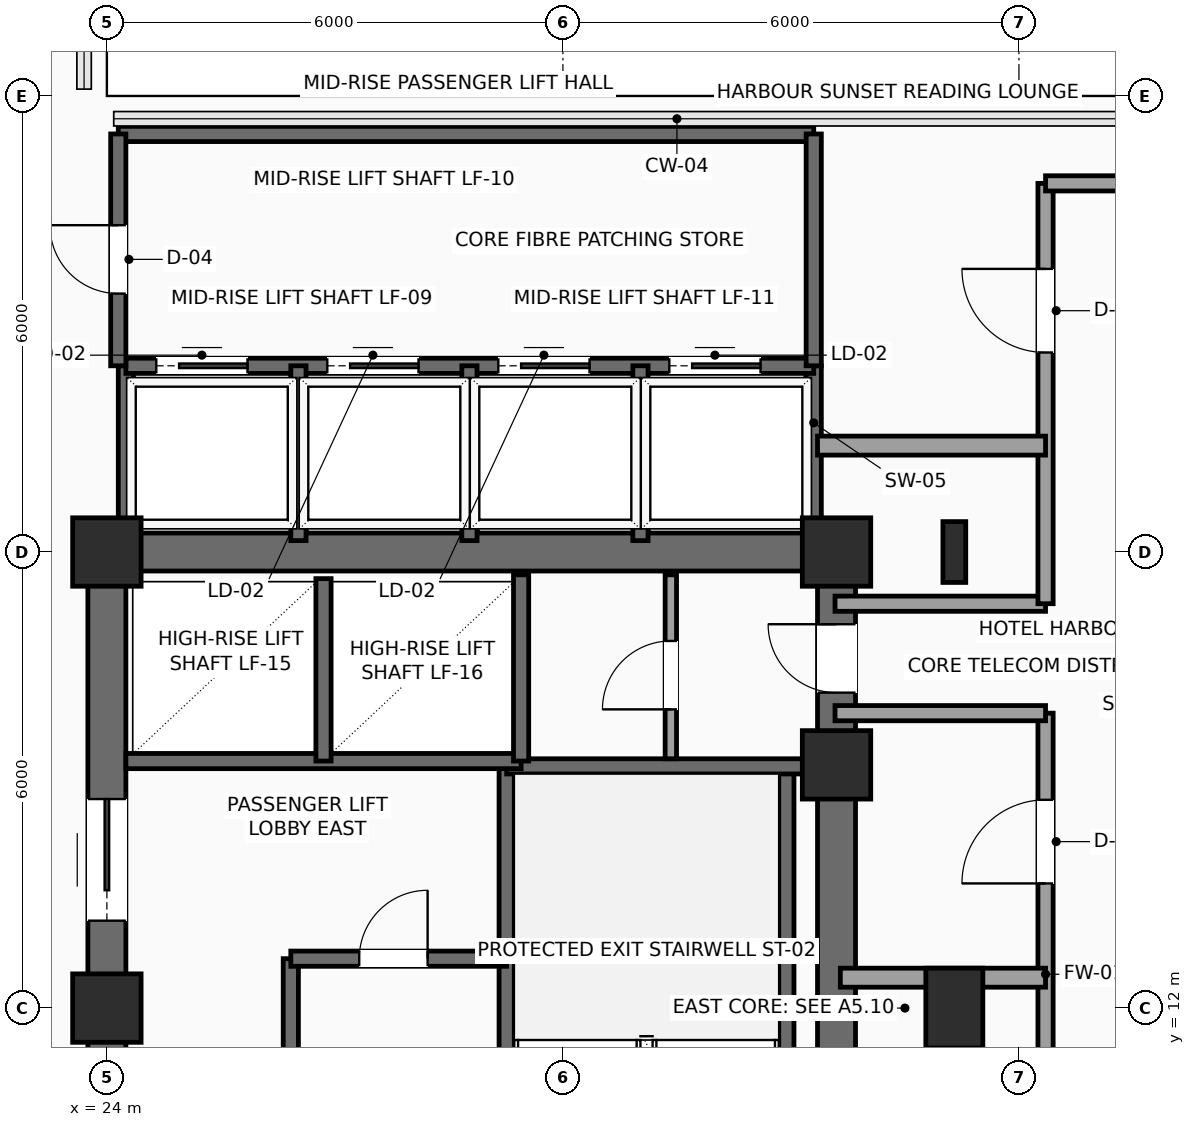
"""IFC4 building model, lengths in metres.
Left out: names, types, materials, properties, quantities, classifications, styles, units other than length and angle.
Written with IfcOpenShell. Run it as: python <this file> out.ifc"""

import sys

from ifc_helpers import new_model, si_unit, direction, frame, frame_2d, origin, origin_2d, place, context, subcontext, project, spatial, rectangle, i_section, extrude, element, fill, save


model = new_model("IFC4")
c1 = context("Model", 3, precision=1e-05, world=origin(), true_north=direction((0.0, 1.0)))
c2 = subcontext(c1, "Body", "Model", "MODEL_VIEW")
j1 = project(units=[si_unit("LENGTHUNIT", "METRE"), si_unit("PLANEANGLEUNIT", "RADIAN")], contexts=[c1])
p1 = place(None, origin())
s1 = spatial("IfcSite", under=j1, at=p1, CompositionType="ELEMENT")
p2 = place(p1, origin())
s2 = spatial("IfcBuilding", under=s1, at=p2, CompositionType="ELEMENT")
p3 = place(p2, frame((0.0, 0.0, 184.2)))
s3 = spatial("IfcBuildingStorey", under=s2, at=p3, CompositionType="ELEMENT", Elevation=184.2)
for number, where, z_axis, x_axis in (
    (1, (24.0, 12.0, 0.0), (0.0, 0.0, 1.0), (1.0, 0.0, 0.0)),
    (2, (24.0, 18.0, 0.0), (0.0, 0.0, 1.0), (1.0, 0.0, 0.0)),
    (3, (33.6, 15.2, 0.0), (0.0, 0.0, 1.0), (1.0, 0.0, 0.0)),
    (4, (33.6, 18.0, 0.0), (0.0, 0.0, 1.0), (1.0, 0.0, 0.0)),
):
    element("IfcColumn", number, at=place(p3, frame(where, z_axis=z_axis, x_axis=x_axis)), inside=s3, PredefinedType="COLUMN", context=c2, shape_type="SweptSolid", body=[
        extrude(rectangle(XDim=0.9, YDim=0.9, at=origin_2d()), origin(), (0.0, 0.0, 1.0), 3.75),
    ])
p4 = place(p3, frame((35.15, 12.0, 0.0), z_axis=(0.0, 0.0, 1.0), x_axis=(1.0, 0.0, 0.0)))
e5 = element("IfcColumn", 5, at=p4, inside=s3, PredefinedType="COLUMN", context=c2, shape_type="SweptSolid", body=[
    extrude(rectangle(XDim=0.75, YDim=1.05, at=origin_2d()), origin(), (0.0, 0.0, 1.0), 3.75),
])
p5 = place(p3, frame((35.15, 18.0, 0.0), z_axis=(0.0, 0.0, 1.0), x_axis=(1.0, 0.0, 0.0)))
e6 = element("IfcColumn", 6, at=p5, inside=s3, PredefinedType="COLUMN", context=c2, shape_type="SweptSolid", body=[
    extrude(i_section(OverallWidth=0.3, OverallDepth=0.8, WebThickness=0.018, FlangeThickness=0.033, FilletRadius=0.03, at=origin_2d()), origin(), (0.0, 0.0, 1.0), 3.75),
])
p6 = place(p3, frame((24.0, 18.0, 0.0), z_axis=(0.0, 0.0, 1.0), x_axis=(1.0, 0.0, 0.0)))
e7 = element("IfcWall", 7, at=p6, inside=s3, PredefinedType="SHEAR", context=c2, shape_type="SweptSolid", body=[
    extrude(rectangle(XDim=9.6, YDim=0.5, at=frame_2d((4.8, 0.0))), origin(), (0.0, 0.0, 1.0), 3.54),
])
p7 = place(p3, frame((24.0, 6.0, 0.0), z_axis=(0.0, 0.0, 1.0), x_axis=(0.0, 1.0, 0.0)))
e8 = element("IfcWall", 8, at=p7, inside=s3, PredefinedType="SHEAR", context=c2, shape_type="SweptSolid", body=[
    extrude(rectangle(XDim=12.0, YDim=0.5, at=frame_2d((6.0, 0.0))), origin(), (0.0, 0.0, 1.0), 3.54),
])
p8 = place(p7, frame((7.15, 0.0, 0.0)))
e9 = element("IfcOpeningElement", 9, at=p8, cuts=e8, PredefinedType="OPENING", context=c2, shape_type="SweptSolid", body=[
    extrude(rectangle(XDim=1.6, YDim=2.3, at=frame_2d((0.8, 1.15))), frame((0.0, 0.26, 0.0), z_axis=(0.0, -1.0, 0.0), x_axis=(1.0, 0.0, 0.0)), (0.0, 0.0, 1.0), 0.52),
])
p9 = place(p3, frame((33.6, 6.0, 0.0), z_axis=(0.0, 0.0, 1.0), x_axis=(0.0, 1.0, 0.0)))
e10 = element("IfcWall", 10, at=p9, inside=s3, PredefinedType="SHEAR", context=c2, shape_type="SweptSolid", body=[
    extrude(rectangle(XDim=12.0, YDim=0.5, at=frame_2d((6.0, 0.0))), origin(), (0.0, 0.0, 1.0), 3.54),
])
p10 = place(p9, frame((10.15, 0.0, 0.0)))
e11 = element("IfcOpeningElement", 11, at=p10, cuts=e10, PredefinedType="OPENING", context=c2, shape_type="SweptSolid", body=[
    extrude(rectangle(XDim=0.9, YDim=2.15, at=frame_2d((0.45, 1.075))), frame((0.0, 0.26, 0.0), z_axis=(0.0, -1.0, 0.0), x_axis=(1.0, 0.0, 0.0)), (0.0, 0.0, 1.0), 0.52),
])
p11 = place(p3, frame((29.26, 6.3, 0.0), z_axis=(0.0, 0.0, 1.0), x_axis=(0.0, 1.0, 0.0)))
e12 = element("IfcWall", 12, at=p11, inside=s3, PredefinedType="SHEAR", context=c2, shape_type="SweptSolid", body=[
    extrude(rectangle(XDim=8.88, YDim=0.2, at=frame_2d((4.44, 0.0))), origin(), (0.0, 0.0, 1.0), 3.54),
])
p12 = place(p11, frame((0.35, 0.0, 0.0)))
e13 = element("IfcOpeningElement", 13, at=p12, cuts=e12, PredefinedType="OPENING", context=c2, shape_type="SweptSolid", body=[
    extrude(rectangle(XDim=1.1, YDim=2.2, at=frame_2d((0.55, 1.1))), frame((0.0, 0.11, 0.0), z_axis=(0.0, -1.0, 0.0), x_axis=(1.0, 0.0, 0.0)), (0.0, 0.0, 1.0), 0.22),
])
p13 = place(p3, frame((32.94, 6.3, 0.0), z_axis=(0.0, 0.0, 1.0), x_axis=(0.0, 1.0, 0.0)))
e14 = element("IfcWall", 14, at=p13, inside=s3, PredefinedType="SHEAR", context=c2, shape_type="SweptSolid", body=[
    extrude(rectangle(XDim=8.88, YDim=0.2, at=frame_2d((4.44, 0.0))), origin(), (0.0, 0.0, 1.0), 3.54),
])
p14 = place(p3, frame((29.26, 15.18, 0.0), z_axis=(0.0, 0.0, 1.0), x_axis=(1.0, 0.0, 0.0)))
e15 = element("IfcWall", 15, at=p14, inside=s3, PredefinedType="SHEAR", context=c2, shape_type="SweptSolid", body=[
    extrude(rectangle(XDim=4.04, YDim=0.2, at=frame_2d((2.02, 0.0))), origin(), (0.0, 0.0, 1.0), 3.54),
])
p15 = place(p3, frame((26.42, 11.25, 0.0), z_axis=(0.0, 0.0, 1.0), x_axis=(0.0, 1.0, 0.0)))
e16 = element("IfcWall", 16, at=p15, inside=s3, PredefinedType="SHEAR", context=c2, shape_type="SweptSolid", body=[
    extrude(rectangle(XDim=1.4, YDim=0.2, at=frame_2d((0.7, 0.0))), origin(), (0.0, 0.0, 1.0), 3.54),
])
p16 = place(p3, frame((26.42, 12.65, 0.0), z_axis=(0.0, 0.0, 1.0), x_axis=(1.0, 0.0, 0.0)))
e17 = element("IfcWall", 17, at=p16, inside=s3, PredefinedType="SHEAR", context=c2, shape_type="SweptSolid", body=[
    extrude(rectangle(XDim=2.84, YDim=0.2, at=frame_2d((1.42, 0.0))), origin(), (0.0, 0.0, 1.0), 3.54),
])
p17 = place(p16, frame((0.9, 0.0, 0.0)))
e18 = element("IfcOpeningElement", 18, at=p17, cuts=e17, PredefinedType="OPENING", context=c2, shape_type="SweptSolid", body=[
    extrude(rectangle(XDim=0.9, YDim=2.15, at=frame_2d((0.45, 1.075))), frame((0.0, 0.11, 0.0), z_axis=(0.0, -1.0, 0.0), x_axis=(1.0, 0.0, 0.0)), (0.0, 0.0, 1.0), 0.22),
])
p18 = place(p3, frame((24.25, 15.25, 0.0), z_axis=(0.0, 0.0, 1.0), x_axis=(1.0, 0.0, 0.0)))
e19 = element("IfcWall", 19, at=p18, inside=s3, PredefinedType="SHEAR", context=c2, shape_type="SweptSolid", body=[
    extrude(rectangle(XDim=5.2, YDim=0.2, at=frame_2d((2.6, 0.0))), origin(), (0.0, 0.0, 1.0), 3.54),
])
p19 = place(p3, frame((26.85, 15.25, 0.0), z_axis=(0.0, 0.0, 1.0), x_axis=(0.0, 1.0, 0.0)))
e20 = element("IfcWall", 20, at=p19, inside=s3, PredefinedType="SHEAR", context=c2, shape_type="SweptSolid", body=[
    extrude(rectangle(XDim=2.4, YDim=0.2, at=frame_2d((1.2, 0.0))), origin(), (0.0, 0.0, 1.0), 3.54),
])
p20 = place(p3, frame((29.45, 15.25, 0.0), z_axis=(0.0, 0.0, 1.0), x_axis=(0.0, 1.0, 0.0)))
e21 = element("IfcWall", 21, at=p20, inside=s3, PredefinedType="SHEAR", context=c2, shape_type="SweptSolid", body=[
    extrude(rectangle(XDim=2.45, YDim=0.2, at=frame_2d((1.225, 0.0))), origin(), (0.0, 0.0, 1.0), 3.54),
])
p21 = place(p3, frame((31.42, 15.28, 0.0), z_axis=(0.0, 0.0, 1.0), x_axis=(0.0, 1.0, 0.0)))
e22 = element("IfcWall", 22, at=p21, inside=s3, PredefinedType="PARTITIONING", context=c2, shape_type="SweptSolid", body=[
    extrude(rectangle(XDim=2.42, YDim=0.15, at=frame_2d((1.21, 0.0))), origin(), (0.0, 0.0, 1.0), 3.54),
])
p22 = place(p21, frame((0.65, 0.0, 0.0)))
e23 = element("IfcOpeningElement", 23, at=p22, cuts=e22, PredefinedType="OPENING", context=c2, shape_type="SweptSolid", body=[
    extrude(rectangle(XDim=0.9, YDim=2.15, at=frame_2d((0.45, 1.075))), frame((0.0, 0.085, 0.0), z_axis=(0.0, -1.0, 0.0), x_axis=(1.0, 0.0, 0.0)), (0.0, 0.0, 1.0), 0.17),
])
for number, where, z_axis, x_axis in (
    (24, (33.3, 18.1, 0.0), (0.0, 0.0, 1.0), (0.0, 1.0, 0.0)),
    (25, (24.25, 18.1, 0.0), (0.0, 0.0, 1.0), (0.0, 1.0, 0.0)),
):
    element("IfcWall", number, at=place(p3, frame(where, z_axis=z_axis, x_axis=x_axis)), inside=s3, PredefinedType="SHEAR", context=c2, shape_type="SweptSolid", body=[
        extrude(rectangle(XDim=2.35, YDim=0.2, at=frame_2d((1.175, 0.0))), origin(), (0.0, 0.0, 1.0), 3.54),
    ])
p23 = place(p3, frame((24.25, 20.45, 0.0), z_axis=(0.0, 0.0, 1.0), x_axis=(1.0, 0.0, 0.0)))
e26 = element("IfcWall", 26, at=p23, inside=s3, PredefinedType="SHEAR", context=c2, shape_type="SweptSolid", body=[
    extrude(rectangle(XDim=9.05, YDim=0.2, at=frame_2d((4.525, 0.0))), origin(), (0.0, 0.0, 1.0), 3.54),
])
p24 = place(p23, frame((0.4, 0.0, 0.0)))
e27 = element("IfcOpeningElement", 27, at=p24, cuts=e26, PredefinedType="OPENING", context=c2, shape_type="SweptSolid", body=[
    extrude(rectangle(XDim=1.2, YDim=2.2, at=frame_2d((0.6, 1.1))), frame((0.0, 0.11, 0.0), z_axis=(0.0, -1.0, 0.0), x_axis=(1.0, 0.0, 0.0)), (0.0, 0.0, 1.0), 0.22),
])
p25 = place(p23, frame((2.65, 0.0, 0.0)))
e28 = element("IfcOpeningElement", 28, at=p25, cuts=e26, PredefinedType="OPENING", context=c2, shape_type="SweptSolid", body=[
    extrude(rectangle(XDim=1.2, YDim=2.2, at=frame_2d((0.6, 1.1))), frame((0.0, 0.11, 0.0), z_axis=(0.0, -1.0, 0.0), x_axis=(1.0, 0.0, 0.0)), (0.0, 0.0, 1.0), 0.22),
])
p26 = place(p23, frame((4.9, 0.0, 0.0)))
e29 = element("IfcOpeningElement", 29, at=p26, cuts=e26, PredefinedType="OPENING", context=c2, shape_type="SweptSolid", body=[
    extrude(rectangle(XDim=1.2, YDim=2.2, at=frame_2d((0.6, 1.1))), frame((0.0, 0.11, 0.0), z_axis=(0.0, -1.0, 0.0), x_axis=(1.0, 0.0, 0.0)), (0.0, 0.0, 1.0), 0.22),
])
p27 = place(p23, frame((7.15, 0.0, 0.0)))
e30 = element("IfcOpeningElement", 30, at=p27, cuts=e26, PredefinedType="OPENING", context=c2, shape_type="SweptSolid", body=[
    extrude(rectangle(XDim=1.2, YDim=2.2, at=frame_2d((0.6, 1.1))), frame((0.0, 0.11, 0.0), z_axis=(0.0, -1.0, 0.0), x_axis=(1.0, 0.0, 0.0)), (0.0, 0.0, 1.0), 0.22),
])
for number, where, z_axis, x_axis in (
    (31, (26.52, 18.15, 0.0), (0.0, 0.0, 1.0), (0.0, 1.0, 0.0)),
    (32, (28.77, 18.15, 0.0), (0.0, 0.0, 1.0), (0.0, 1.0, 0.0)),
    (33, (31.02, 18.15, 0.0), (0.0, 0.0, 1.0), (0.0, 1.0, 0.0)),
):
    element("IfcWall", number, at=place(p3, frame(where, z_axis=z_axis, x_axis=x_axis)), inside=s3, PredefinedType="SHEAR", context=c2, shape_type="SweptSolid", body=[
        extrude(rectangle(XDim=2.3, YDim=0.2, at=frame_2d((1.15, 0.0))), origin(), (0.0, 0.0, 1.0), 3.54),
    ])
p28 = place(p3, frame((24.15, 23.5, 0.0), z_axis=(0.0, 0.0, 1.0), x_axis=(1.0, 0.0, 0.0)))
e34 = element("IfcWall", 34, at=p28, inside=s3, PredefinedType="SHEAR", context=c2, shape_type="SweptSolid", body=[
    extrude(rectangle(XDim=9.15, YDim=0.2, at=frame_2d((4.575, 0.0))), origin(), (0.0, 0.0, 1.0), 3.54),
])
p29 = place(p3, frame((33.3, 20.45, 0.0), z_axis=(0.0, 0.0, 1.0), x_axis=(0.0, 1.0, 0.0)))
e35 = element("IfcWall", 35, at=p29, inside=s3, PredefinedType="SHEAR", context=c2, shape_type="SweptSolid", body=[
    extrude(rectangle(XDim=3.05, YDim=0.2, at=frame_2d((1.525, 0.0))), origin(), (0.0, 0.0, 1.0), 3.54),
])
p30 = place(p3, frame((24.15, 20.45, 0.0), z_axis=(0.0, 0.0, 1.0), x_axis=(0.0, 1.0, 0.0)))
e36 = element("IfcWall", 36, at=p30, inside=s3, PredefinedType="SHEAR", context=c2, shape_type="SweptSolid", body=[
    extrude(rectangle(XDim=3.05, YDim=0.2, at=frame_2d((1.525, 0.0))), origin(), (0.0, 0.0, 1.0), 3.54),
])
p31 = place(p30, frame((0.95, 0.0, 0.0)))
e37 = element("IfcOpeningElement", 37, at=p31, cuts=e36, PredefinedType="OPENING", context=c2, shape_type="SweptSolid", body=[
    extrude(rectangle(XDim=0.9, YDim=2.15, at=frame_2d((0.45, 1.075))), frame((0.0, 0.11, 0.0), z_axis=(0.0, -1.0, 0.0), x_axis=(1.0, 0.0, 0.0)), (0.0, 0.0, 1.0), 0.22),
])
p32 = place(p3, frame((36.35, 5.8, 0.0), z_axis=(0.0, 0.0, 1.0), x_axis=(0.0, 1.0, 0.0)))
e38 = element("IfcWall", 38, at=p32, inside=s3, PredefinedType="SOLIDWALL", context=c2, shape_type="SweptSolid", body=[
    extrude(rectangle(XDim=10.08, YDim=0.2, at=frame_2d((5.04, 0.0))), origin(), (0.0, 0.0, 1.0), 3.54),
])
p33 = place(p32, frame((1.05, 0.0, 0.0)))
e39 = element("IfcOpeningElement", 39, at=p33, cuts=e38, PredefinedType="OPENING", context=c2, shape_type="SweptSolid", body=[
    extrude(rectangle(XDim=1.1, YDim=2.25, at=frame_2d((0.55, 1.125))), frame((0.0, 0.11, 0.0), z_axis=(0.0, -1.0, 0.0), x_axis=(1.0, 0.0, 0.0)), (0.0, 0.0, 1.0), 0.22),
])
p34 = place(p32, frame((4.35, 0.0, 0.0)))
e40 = element("IfcOpeningElement", 40, at=p34, cuts=e38, PredefinedType="OPENING", context=c2, shape_type="SweptSolid", body=[
    extrude(rectangle(XDim=1.1, YDim=2.25, at=frame_2d((0.55, 1.125))), frame((0.0, 0.11, 0.0), z_axis=(0.0, -1.0, 0.0), x_axis=(1.0, 0.0, 0.0)), (0.0, 0.0, 1.0), 0.22),
])
p35 = place(p32, frame((7.84, 0.0, 0.0)))
e41 = element("IfcOpeningElement", 41, at=p35, cuts=e38, PredefinedType="OPENING", context=c2, shape_type="SweptSolid", body=[
    extrude(rectangle(XDim=1.1, YDim=2.25, at=frame_2d((0.55, 1.125))), frame((0.0, 0.11, 0.0), z_axis=(0.0, -1.0, 0.0), x_axis=(1.0, 0.0, 0.0)), (0.0, 0.0, 1.0), 0.22),
])
for number, where, z_axis, x_axis in (
    (42, (36.35, 15.88, 0.0), (0.0, 0.0, 1.0), (-1.0, 0.0, 0.0)),
    (43, (33.58, 17.32, 0.0), (0.0, 0.0, 1.0), (1.0, 0.0, 0.0)),
):
    element("IfcWall", number, at=place(p3, frame(where, z_axis=z_axis, x_axis=x_axis)), inside=s3, PredefinedType="SOLIDWALL", context=c2, shape_type="SweptSolid", body=[
        extrude(rectangle(XDim=2.77, YDim=0.2, at=frame_2d((1.385, 0.0))), origin(), (0.0, 0.0, 1.0), 3.54),
    ])
p36 = place(p3, frame((36.35, 17.32, 0.0), z_axis=(0.0, 0.0, 1.0), x_axis=(0.0, 1.0, 0.0)))
e44 = element("IfcWall", 44, at=p36, inside=s3, PredefinedType="SOLIDWALL", context=c2, shape_type="SweptSolid", body=[
    extrude(rectangle(XDim=5.53, YDim=0.2, at=frame_2d((2.765, 0.0))), origin(), (0.0, 0.0, 1.0), 3.54),
])
p37 = place(p36, frame((3.305, 0.0, 0.0)))
e45 = element("IfcOpeningElement", 45, at=p37, cuts=e44, PredefinedType="OPENING", context=c2, shape_type="SweptSolid", body=[
    extrude(rectangle(XDim=1.1, YDim=2.25, at=frame_2d((0.55, 1.125))), frame((0.0, 0.11, 0.0), z_axis=(0.0, -1.0, 0.0), x_axis=(1.0, 0.0, 0.0)), (0.0, 0.0, 1.0), 0.22),
])
p38 = place(p3, frame((36.35, 22.85, 0.0), z_axis=(0.0, 0.0, 1.0), x_axis=(1.0, 0.0, 0.0)))
e46 = element("IfcWall", 46, at=p38, inside=s3, PredefinedType="SOLIDWALL", context=c2, shape_type="SweptSolid", body=[
    extrude(rectangle(XDim=2.1, YDim=0.2, at=frame_2d((1.05, 0.0))), origin(), (0.0, 0.0, 1.0), 3.54),
])
p39 = place(p3, frame((33.65, 12.4, 0.0), z_axis=(0.0, 0.0, 1.0), x_axis=(1.0, 0.0, 0.0)))
e47 = element("IfcWall", 47, at=p39, inside=s3, PredefinedType="PARTITIONING", context=c2, shape_type="SweptSolid", body=[
    extrude(rectangle(XDim=2.7, YDim=0.25, at=frame_2d((1.35, 0.0))), origin(), (0.0, 0.0, 1.0), 3.54),
])
p40 = place(p3, frame((33.35, 19.4, 0.0), z_axis=(0.0, 0.0, 1.0), x_axis=(1.0, 0.0, 0.0)))
e48 = element("IfcWall", 48, at=p40, inside=s3, PredefinedType="PARTITIONING", context=c2, shape_type="SweptSolid", body=[
    extrude(rectangle(XDim=3.0, YDim=0.25, at=frame_2d((1.5, 0.0))), origin(), (0.0, 0.0, 1.0), 3.54),
])
p41 = place(p8, origin())
e49 = element("IfcDoor", 49, at=p41, inside=s3, OperationType="DOUBLE_DOOR_SLIDING", PredefinedType="DOOR", context=c2, shape_type="SweptSolid", body=[
    extrude(rectangle(XDim=1.6, YDim=2.3, at=frame_2d((0.8, 1.15))), frame((0.0, 0.025, 0.0), z_axis=(0.0, -1.0, 0.0), x_axis=(1.0, 0.0, 0.0)), (0.0, 0.0, 1.0), 0.05),
])
fill(e9, e49)
p42 = place(p10, origin())
e50 = element("IfcDoor", 50, at=p42, inside=s3, OperationType="SINGLE_SWING_RIGHT", PredefinedType="DOOR", context=c2, shape_type="SweptSolid", body=[
    extrude(rectangle(XDim=0.9, YDim=2.15, at=frame_2d((0.45, 1.075))), frame((0.0, 0.025, 0.0), z_axis=(0.0, -1.0, 0.0), x_axis=(1.0, 0.0, 0.0)), (0.0, 0.0, 1.0), 0.05),
])
fill(e11, e50)
p43 = place(p17, origin())
e51 = element("IfcDoor", 51, at=p43, inside=s3, OperationType="SINGLE_SWING_RIGHT", PredefinedType="DOOR", context=c2, shape_type="SweptSolid", body=[
    extrude(rectangle(XDim=0.9, YDim=2.15, at=frame_2d((0.45, 1.075))), frame((0.0, 0.025, 0.0), z_axis=(0.0, -1.0, 0.0), x_axis=(1.0, 0.0, 0.0)), (0.0, 0.0, 1.0), 0.05),
])
fill(e18, e51)
p44 = place(p22, origin())
e52 = element("IfcDoor", 52, at=p44, inside=s3, OperationType="SINGLE_SWING_LEFT", PredefinedType="DOOR", context=c2, shape_type="SweptSolid", body=[
    extrude(rectangle(XDim=0.9, YDim=2.15, at=frame_2d((0.45, 1.075))), frame((0.0, 0.025, 0.0), z_axis=(0.0, -1.0, 0.0), x_axis=(1.0, 0.0, 0.0)), (0.0, 0.0, 1.0), 0.05),
])
fill(e23, e52)
p45 = place(p24, origin())
e53 = element("IfcDoor", 53, at=p45, inside=s3, OperationType="SLIDING_TO_RIGHT", PredefinedType="DOOR", context=c2, shape_type="SweptSolid", body=[
    extrude(rectangle(XDim=1.2, YDim=2.2, at=frame_2d((0.6, 1.1))), frame((0.0, 0.025, 0.0), z_axis=(0.0, -1.0, 0.0), x_axis=(1.0, 0.0, 0.0)), (0.0, 0.0, 1.0), 0.05),
])
fill(e27, e53)
p46 = place(p25, origin())
e54 = element("IfcDoor", 54, at=p46, inside=s3, OperationType="SLIDING_TO_RIGHT", PredefinedType="DOOR", context=c2, shape_type="SweptSolid", body=[
    extrude(rectangle(XDim=1.2, YDim=2.2, at=frame_2d((0.6, 1.1))), frame((0.0, 0.025, 0.0), z_axis=(0.0, -1.0, 0.0), x_axis=(1.0, 0.0, 0.0)), (0.0, 0.0, 1.0), 0.05),
])
fill(e28, e54)
p47 = place(p26, origin())
e55 = element("IfcDoor", 55, at=p47, inside=s3, OperationType="SLIDING_TO_RIGHT", PredefinedType="DOOR", context=c2, shape_type="SweptSolid", body=[
    extrude(rectangle(XDim=1.2, YDim=2.2, at=frame_2d((0.6, 1.1))), frame((0.0, 0.025, 0.0), z_axis=(0.0, -1.0, 0.0), x_axis=(1.0, 0.0, 0.0)), (0.0, 0.0, 1.0), 0.05),
])
fill(e29, e55)
p48 = place(p27, origin())
e56 = element("IfcDoor", 56, at=p48, inside=s3, OperationType="SLIDING_TO_RIGHT", PredefinedType="DOOR", context=c2, shape_type="SweptSolid", body=[
    extrude(rectangle(XDim=1.2, YDim=2.2, at=frame_2d((0.6, 1.1))), frame((0.0, 0.025, 0.0), z_axis=(0.0, -1.0, 0.0), x_axis=(1.0, 0.0, 0.0)), (0.0, 0.0, 1.0), 0.05),
])
fill(e30, e56)
p49 = place(p31, origin())
e57 = element("IfcDoor", 57, at=p49, inside=s3, OperationType="SINGLE_SWING_RIGHT", PredefinedType="DOOR", context=c2, shape_type="SweptSolid", body=[
    extrude(rectangle(XDim=0.9, YDim=2.15, at=frame_2d((0.45, 1.075))), frame((0.0, 0.025, 0.0), z_axis=(0.0, -1.0, 0.0), x_axis=(1.0, 0.0, 0.0)), (0.0, 0.0, 1.0), 0.05),
])
fill(e37, e57)
p50 = place(p35, origin())
e58 = element("IfcDoor", 58, at=p50, inside=s3, OperationType="SINGLE_SWING_LEFT", PredefinedType="DOOR", context=c2, shape_type="SweptSolid", body=[
    extrude(rectangle(XDim=1.1, YDim=2.25, at=frame_2d((0.55, 1.125))), frame((0.0, 0.025, 0.0), z_axis=(0.0, -1.0, 0.0), x_axis=(1.0, 0.0, 0.0)), (0.0, 0.0, 1.0), 0.05),
])
fill(e41, e58)
p51 = place(p37, origin())
e59 = element("IfcDoor", 59, at=p51, inside=s3, OperationType="SINGLE_SWING_RIGHT", PredefinedType="DOOR", context=c2, shape_type="SweptSolid", body=[
    extrude(rectangle(XDim=1.1, YDim=2.25, at=frame_2d((0.55, 1.125))), frame((0.0, 0.025, 0.0), z_axis=(0.0, -1.0, 0.0), x_axis=(1.0, 0.0, 0.0)), (0.0, 0.0, 1.0), 0.05),
])
fill(e45, e59)
save(model, sys.argv[1])
